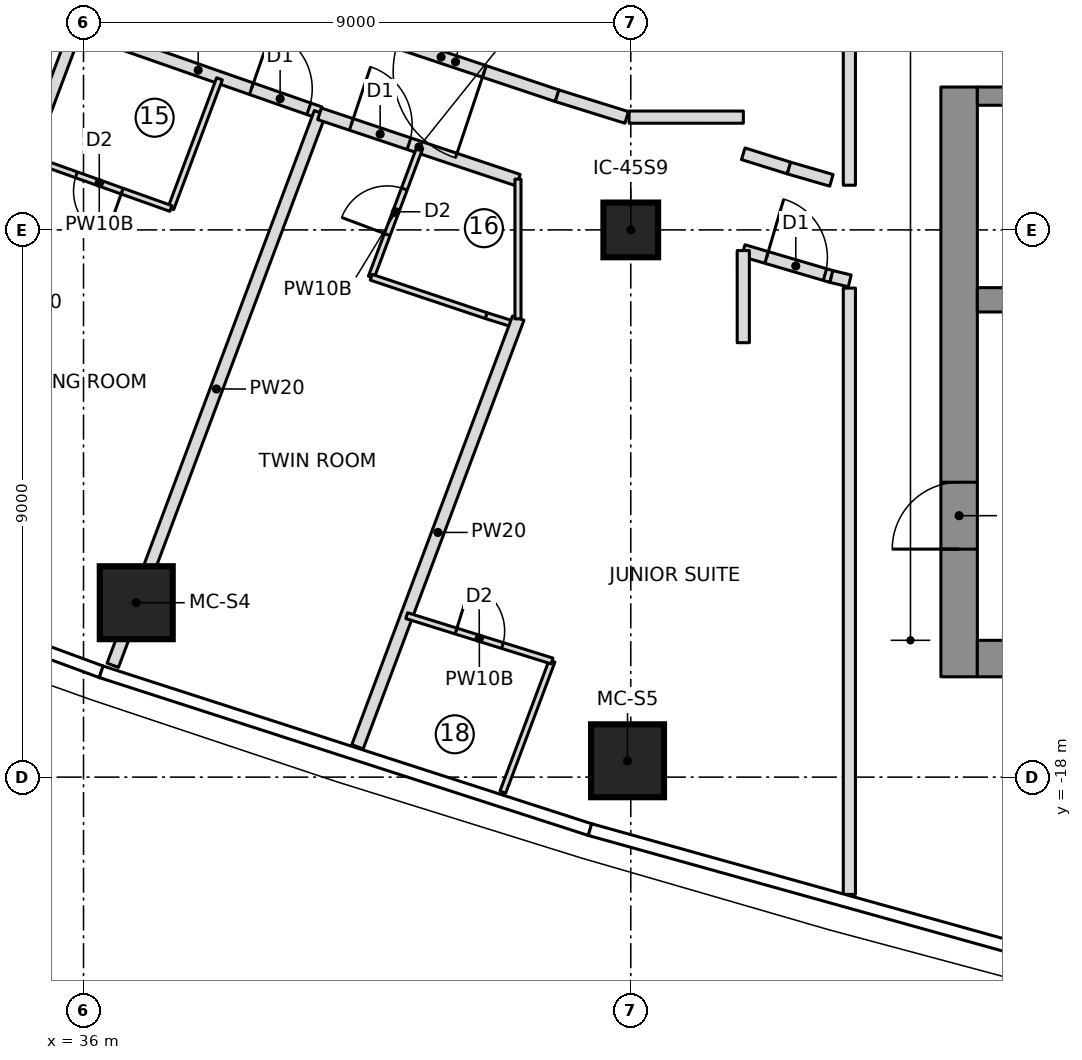
"""IFC4 building model, lengths in metres.
Left out: names, types, materials, properties, quantities, classifications, styles, units other than length and angle.
Written with IfcOpenShell. Run it as: python <this file> out.ifc"""

import sys

from ifc_helpers import new_model, si_unit, direction, frame, frame_2d, origin, origin_2d, place, context, subcontext, project, spatial, rectangle, extrude, element, fill, save


model = new_model("IFC4")
c1 = context("Model", 3, precision=1e-05, world=origin(), true_north=direction((0.0, 1.0)))
c2 = subcontext(c1, "Body", "Model", "MODEL_VIEW")
j1 = project(units=[si_unit("LENGTHUNIT", "METRE"), si_unit("PLANEANGLEUNIT", "RADIAN")], contexts=[c1])
p1 = place(None, origin())
s1 = spatial("IfcSite", under=j1, at=p1, CompositionType="ELEMENT")
p2 = place(p1, origin())
s2 = spatial("IfcBuilding", under=s1, at=p2, CompositionType="ELEMENT")
p3 = place(p2, frame((0.0, 0.0, 224.35)))
s3 = spatial("IfcBuildingStorey", under=s2, at=p3, CompositionType="ELEMENT", Elevation=224.35)
p4 = place(p3, frame((50.4, -16.35, 0.0), z_axis=(0.0, 0.0, 1.0), x_axis=(0.0, 1.0, 0.0)))
e1 = element("IfcWall", 1, at=p4, inside=s3, PredefinedType="SHEAR", context=c2, shape_type="SweptSolid", body=[
    extrude(rectangle(XDim=9.7, YDim=0.6, at=frame_2d((4.85, 0.0))), origin(), (0.0, 0.0, 1.0), 3.55),
])
p5 = place(p4, frame((2.1, 0.0, 0.0)))
e2 = element("IfcOpeningElement", 2, at=p5, cuts=e1, PredefinedType="OPENING", context=c2, shape_type="SweptSolid", body=[
    extrude(rectangle(XDim=1.1, YDim=2.1, at=frame_2d((0.55, 1.05))), frame((0.0, 0.31, 0.0), z_axis=(0.0, -1.0, 0.0), x_axis=(1.0, 0.0, 0.0)), (0.0, 0.0, 1.0), 0.62),
])
p6 = place(p3, frame((50.7, -16.05, 0.0), z_axis=(0.0, 0.0, 1.0), x_axis=(1.0, 0.0, 0.0)))
e3 = element("IfcWall", 3, at=p6, inside=s3, PredefinedType="SHEAR", context=c2, shape_type="SweptSolid", body=[
    extrude(rectangle(XDim=13.62, YDim=0.6, at=frame_2d((6.81, 0.0))), origin(), (0.0, 0.0, 1.0), 3.55),
])
p7 = place(p3, frame((50.7, -10.15, 0.0), z_axis=(0.0, 0.0, 1.0), x_axis=(1.0, 0.0, 0.0)))
e4 = element("IfcWall", 4, at=p7, inside=s3, PredefinedType="SHEAR", context=c2, shape_type="SweptSolid", body=[
    extrude(rectangle(XDim=13.02, YDim=0.4, at=frame_2d((6.51, 0.0))), origin(), (0.0, 0.0, 1.0), 3.55),
])
p8 = place(p3, frame((50.7, -6.8, 0.0), z_axis=(0.0, 0.0, 1.0), x_axis=(1.0, 0.0, 0.0)))
e5 = element("IfcWall", 5, at=p8, inside=s3, PredefinedType="SHEAR", context=c2, shape_type="SweptSolid", body=[
    extrude(rectangle(XDim=10.9, YDim=0.3, at=frame_2d((5.45, 0.0))), origin(), (0.0, 0.0, 1.0), 3.55),
])
p9 = place(p8, frame((6.3, 0.0, 0.0)))
e6 = element("IfcOpeningElement", 6, at=p9, cuts=e5, PredefinedType="OPENING", context=c2, shape_type="SweptSolid", body=[
    extrude(rectangle(XDim=1.1, YDim=2.1, at=frame_2d((0.55, 1.05))), frame((0.0, 0.16, 0.0), z_axis=(0.0, -1.0, 0.0), x_axis=(1.0, 0.0, 0.0)), (0.0, 0.0, 1.0), 0.32),
])
p10 = place(p8, frame((9.1, 0.0, 0.0)))
e7 = element("IfcOpeningElement", 7, at=p10, cuts=e5, PredefinedType="OPENING", context=c2, shape_type="SweptSolid", body=[
    extrude(rectangle(XDim=1.1, YDim=2.1, at=frame_2d((0.55, 1.05))), frame((0.0, 0.16, 0.0), z_axis=(0.0, -1.0, 0.0), x_axis=(1.0, 0.0, 0.0)), (0.0, 0.0, 1.0), 0.32),
])
p11 = place(p8, frame((0.8, 0.0, 0.0)))
e8 = element("IfcOpeningElement", 8, at=p11, cuts=e5, PredefinedType="OPENING", context=c2, shape_type="SweptSolid", body=[
    extrude(rectangle(XDim=0.9, YDim=2.1, at=frame_2d((0.45, 1.05))), frame((0.0, 0.16, 0.0), z_axis=(0.0, -1.0, 0.0), x_axis=(1.0, 0.0, 0.0)), (0.0, 0.0, 1.0), 0.32),
])
p12 = place(p8, frame((3.6, 0.0, 0.0)))
e9 = element("IfcOpeningElement", 9, at=p12, cuts=e5, PredefinedType="OPENING", context=c2, shape_type="SweptSolid", body=[
    extrude(rectangle(XDim=0.9, YDim=2.1, at=frame_2d((0.45, 1.05))), frame((0.0, 0.16, 0.0), z_axis=(0.0, -1.0, 0.0), x_axis=(1.0, 0.0, 0.0)), (0.0, 0.0, 1.0), 0.32),
])
for number, where, z_axis, x_axis in (
    (10, (36.867, -15.132, 0.0), (0.0, 0.0, 1.0), (1.0, 0.0, 0.0)),
    (11, (44.947, -17.731, 0.0), (0.0, 0.0, 1.0), (1.0, 0.0, 0.0)),
):
    element("IfcColumn", number, at=place(p3, frame(where, z_axis=z_axis, x_axis=x_axis)), inside=s3, PredefinedType="COLUMN", context=c2, shape_type="SweptSolid", body=[
        extrude(rectangle(XDim=1.2, YDim=1.2, at=origin_2d()), origin(), (0.0, 0.0, 1.0), 3.55),
    ])
p13 = place(p3, frame((45.0, -9.0, 0.0), z_axis=(0.0, 0.0, 1.0), x_axis=(1.0, 0.0, 0.0)))
e12 = element("IfcColumn", 12, at=p13, inside=s3, PredefinedType="COLUMN", context=c2, shape_type="SweptSolid", body=[
    extrude(rectangle(XDim=0.9, YDim=0.9, at=origin_2d()), origin(), (0.0, 0.0, 1.0), 3.55),
])
p14 = place(p3, frame((32.483, -14.738, 0.0), z_axis=(0.0, 0.0, 1.0), x_axis=(0.351117925717, 0.936331246002, 0.0)))
e13 = element("IfcWall", 13, at=p14, inside=s3, PredefinedType="PARTITIONING", context=c2, shape_type="SweptSolid", body=[
    extrude(rectangle(XDim=9.701, YDim=0.2, at=frame_2d((4.851, 0.0))), origin(), (0.0, 0.0, 1.0), 3.25),
])
p15 = place(p3, frame((35.882, -5.673, 0.0), z_axis=(0.0, 0.0, 1.0), x_axis=(0.944107376821, -0.329638075823, 0.0)))
e14 = element("IfcWall", 14, at=p15, inside=s3, PredefinedType="PARTITIONING", context=c2, shape_type="SweptSolid", body=[
    extrude(rectangle(XDim=4.245, YDim=0.2, at=frame_2d((2.122, 0.0))), origin(), (0.0, 0.0, 1.0), 3.25),
])
p16 = place(p15, frame((3.05, 0.0, 0.0)))
e15 = element("IfcOpeningElement", 15, at=p16, cuts=e14, PredefinedType="OPENING", context=c2, shape_type="SweptSolid", body=[
    extrude(rectangle(XDim=1.0, YDim=2.1, at=frame_2d((0.5, 1.05))), frame((0.0, 0.11, 0.0), z_axis=(0.0, -1.0, 0.0), x_axis=(1.0, 0.0, 0.0)), (0.0, 0.0, 1.0), 0.22),
])
p17 = place(p3, frame((38.236, -6.516, 0.0), z_axis=(0.0, 0.0, 1.0), x_axis=(-0.351229183496, -0.936289517543, 0.0)))
e16 = element("IfcWall", 16, at=p17, inside=s3, PredefinedType="PARTITIONING", context=c2, shape_type="SweptSolid", body=[
    extrude(rectangle(XDim=2.277, YDim=0.1, at=frame_2d((1.139, 0.0))), origin(), (0.0, 0.0, 1.0), 3.25),
])
p18 = place(p3, frame((37.436, -8.648, 0.0), z_axis=(0.0, 0.0, 1.0), x_axis=(-0.941896455552, 0.335903359641, 0.0)))
e17 = element("IfcWall", 17, at=p18, inside=s3, PredefinedType="PARTITIONING", context=c2, shape_type="SweptSolid", body=[
    extrude(rectangle(XDim=2.5, YDim=0.1, at=frame_2d((1.25, 0.0))), origin(), (0.0, 0.0, 1.0), 3.25),
])
p19 = place(p18, frame((0.85, 0.0, 0.0)))
e18 = element("IfcOpeningElement", 18, at=p19, cuts=e17, PredefinedType="OPENING", context=c2, shape_type="SweptSolid", body=[
    extrude(rectangle(XDim=0.8, YDim=2.1, at=frame_2d((0.4, 1.05))), frame((0.0, 0.06, 0.0), z_axis=(0.0, -1.0, 0.0), x_axis=(1.0, 0.0, 0.0)), (0.0, 0.0, 1.0), 0.12),
])
p20 = place(p3, frame((36.481, -16.161, 0.0), z_axis=(0.0, 0.0, 1.0), x_axis=(0.35112895446, 0.936327110224, 0.0)))
e19 = element("IfcWall", 19, at=p20, inside=s3, PredefinedType="PARTITIONING", context=c2, shape_type="SweptSolid", body=[
    extrude(rectangle(XDim=9.706, YDim=0.2, at=frame_2d((4.853, 0.0))), origin(), (0.0, 0.0, 1.0), 3.25),
])
p21 = place(p3, frame((39.882, -7.091, 0.0), z_axis=(0.0, 0.0, 1.0), x_axis=(0.948477584784, -0.316844238013, 0.0)))
e20 = element("IfcWall", 20, at=p21, inside=s3, PredefinedType="PARTITIONING", context=c2, shape_type="SweptSolid", body=[
    extrude(rectangle(XDim=3.445, YDim=0.2, at=frame_2d((1.723, 0.0))), origin(), (0.0, 0.0, 1.0), 3.25),
])
p22 = place(p21, frame((0.55, 0.0, 0.0)))
e21 = element("IfcOpeningElement", 21, at=p22, cuts=e20, PredefinedType="OPENING", context=c2, shape_type="SweptSolid", body=[
    extrude(rectangle(XDim=1.0, YDim=2.1, at=frame_2d((0.5, 1.05))), frame((0.0, 0.11, 0.0), z_axis=(0.0, -1.0, 0.0), x_axis=(1.0, 0.0, 0.0)), (0.0, 0.0, 1.0), 0.22),
])
p23 = place(p3, frame((40.732, -9.779, 0.0), z_axis=(0.0, 0.0, 1.0), x_axis=(0.351146927505, 0.936320370014, 0.0)))
e22 = element("IfcWall", 22, at=p23, inside=s3, PredefinedType="PARTITIONING", context=c2, shape_type="SweptSolid", body=[
    extrude(rectangle(XDim=2.278, YDim=0.1, at=frame_2d((1.139, 0.0))), origin(), (0.0, 0.0, 1.0), 3.25),
])
p24 = place(p23, frame((0.75, 0.0, 0.0)))
e23 = element("IfcOpeningElement", 23, at=p24, cuts=e22, PredefinedType="OPENING", context=c2, shape_type="SweptSolid", body=[
    extrude(rectangle(XDim=0.8, YDim=2.1, at=frame_2d((0.4, 1.05))), frame((0.0, 0.06, 0.0), z_axis=(0.0, -1.0, 0.0), x_axis=(1.0, 0.0, 0.0)), (0.0, 0.0, 1.0), 0.12),
])
p25 = place(p3, frame((43.108, -10.562, 0.0), z_axis=(0.0, 0.0, 1.0), x_axis=(-0.954624465478, 0.297812239356, 0.0)))
e24 = element("IfcWall", 24, at=p25, inside=s3, PredefinedType="PARTITIONING", context=c2, shape_type="SweptSolid", body=[
    extrude(rectangle(XDim=0.511, YDim=0.1, at=frame_2d((0.255, 0.0))), origin(), (0.0, 0.0, 1.0), 3.25),
])
p26 = place(p3, frame((42.621, -10.409, 0.0), z_axis=(0.0, 0.0, 1.0), x_axis=(-0.948499248693, 0.316779379426, 0.0)))
e25 = element("IfcWall", 25, at=p26, inside=s3, PredefinedType="PARTITIONING", context=c2, shape_type="SweptSolid", body=[
    extrude(rectangle(XDim=1.991, YDim=0.1, at=frame_2d((0.996, 0.0))), origin(), (0.0, 0.0, 1.0), 3.25),
])
p27 = place(p3, frame((40.506, -17.501, 0.0), z_axis=(0.0, 0.0, 1.0), x_axis=(0.351119888923, 0.936330509811, 0.0)))
e26 = element("IfcWall", 26, at=p27, inside=s3, PredefinedType="PARTITIONING", context=c2, shape_type="SweptSolid", body=[
    extrude(rectangle(XDim=7.531, YDim=0.2, at=frame_2d((3.766, 0.0))), origin(), (0.0, 0.0, 1.0), 3.25),
])
p28 = place(p3, frame((43.705, -16.09, 0.0), z_axis=(0.0, 0.0, 1.0), x_axis=(-0.351111827312, -0.936333532841, 0.0)))
e27 = element("IfcWall", 27, at=p28, inside=s3, PredefinedType="PARTITIONING", context=c2, shape_type="SweptSolid", body=[
    extrude(rectangle(XDim=2.304, YDim=0.1, at=frame_2d((1.152, 0.0))), origin(), (0.0, 0.0, 1.0), 3.25),
])
p29 = place(p3, frame((41.315, -15.344, 0.0), z_axis=(0.0, 0.0, 1.0), x_axis=(0.954665433195, -0.297680887299, 0.0)))
e28 = element("IfcWall", 28, at=p29, inside=s3, PredefinedType="PARTITIONING", context=c2, shape_type="SweptSolid", body=[
    extrude(rectangle(XDim=2.504, YDim=0.1, at=frame_2d((1.252, 0.0))), origin(), (0.0, 0.0, 1.0), 3.25),
])
p30 = place(p29, frame((0.85, 0.0, 0.0)))
e29 = element("IfcOpeningElement", 29, at=p30, cuts=e28, PredefinedType="OPENING", context=c2, shape_type="SweptSolid", body=[
    extrude(rectangle(XDim=0.8, YDim=2.1, at=frame_2d((0.4, 1.05))), frame((0.0, 0.06, 0.0), z_axis=(0.0, -1.0, 0.0), x_axis=(1.0, 0.0, 0.0)), (0.0, 0.0, 1.0), 0.12),
])
p31 = place(p3, frame((43.788, -6.793, 0.0), z_axis=(0.0, 0.0, 1.0), x_axis=(-0.948475139593, 0.316851557632, 0.0)))
e30 = element("IfcWall", 30, at=p31, inside=s3, PredefinedType="PARTITIONING", context=c2, shape_type="SweptSolid", body=[
    extrude(rectangle(XDim=3.522, YDim=0.2, at=frame_2d((1.761, 0.0))), origin(), (0.0, 0.0, 1.0), 3.25),
])
p32 = place(p31, frame((1.261, 0.0, 0.0)))
e31 = element("IfcOpeningElement", 31, at=p32, cuts=e30, PredefinedType="OPENING", context=c2, shape_type="SweptSolid", body=[
    extrude(rectangle(XDim=1.5, YDim=2.1, at=frame_2d((0.75, 1.05))), frame((0.0, 0.11, 0.0), z_axis=(0.0, -1.0, 0.0), x_axis=(1.0, 0.0, 0.0)), (0.0, 0.0, 1.0), 0.22),
])
p33 = place(p3, frame((47.602, -7.982, 0.0), z_axis=(0.0, 0.0, 1.0), x_axis=(-0.95461224237, 0.297851417181, 0.0)))
e32 = element("IfcWall", 32, at=p33, inside=s3, PredefinedType="PARTITIONING", context=c2, shape_type="SweptSolid", body=[
    extrude(rectangle(XDim=0.788, YDim=0.2, at=frame_2d((0.394, 0.0))), origin(), (0.0, 0.0, 1.0), 3.25),
])
p34 = place(p3, frame((44.933, -7.15, 0.0), z_axis=(0.0, 0.0, 1.0), x_axis=(-0.954693570678, 0.29759063511, 0.0)))
e33 = element("IfcWall", 33, at=p34, inside=s3, PredefinedType="PARTITIONING", context=c2, shape_type="SweptSolid", body=[
    extrude(rectangle(XDim=1.198, YDim=0.2, at=frame_2d((0.599, 0.0))), origin(), (0.0, 0.0, 1.0), 3.25),
])
p35 = place(p3, frame((43.145, -8.165, 0.0), z_axis=(0.0, 0.0, 1.0), x_axis=(0.0, -1.0, 0.0)))
e34 = element("IfcWall", 34, at=p35, inside=s3, PredefinedType="PARTITIONING", context=c2, shape_type="SweptSolid", body=[
    extrude(rectangle(XDim=2.298, YDim=0.1, at=frame_2d((1.149, 0.0))), origin(), (0.0, 0.0, 1.0), 3.25),
])
p36 = place(p3, frame((46.85, -9.34, 0.0), z_axis=(0.0, 0.0, 1.0), x_axis=(0.95944263903, -0.281903924079, 0.0)))
e35 = element("IfcWall", 35, at=p36, inside=s3, PredefinedType="PARTITIONING", context=c2, shape_type="SweptSolid", body=[
    extrude(rectangle(XDim=1.511, YDim=0.2, at=frame_2d((0.756, 0.0))), origin(), (0.0, 0.0, 1.0), 3.25),
])
p37 = place(p36, frame((0.4, 0.0, 0.0)))
e36 = element("IfcOpeningElement", 36, at=p37, cuts=e35, PredefinedType="OPENING", context=c2, shape_type="SweptSolid", body=[
    extrude(rectangle(XDim=1.0, YDim=2.1, at=frame_2d((0.5, 1.05))), frame((0.0, 0.11, 0.0), z_axis=(0.0, -1.0, 0.0), x_axis=(1.0, 0.0, 0.0)), (0.0, 0.0, 1.0), 0.22),
])
p38 = place(p3, frame((48.3, -8.185, 0.0), z_axis=(0.0, 0.0, 1.0), x_axis=(-0.960439023181, 0.278490363839, 0.0)))
e37 = element("IfcWall", 37, at=p38, inside=s3, PredefinedType="PARTITIONING", context=c2, shape_type="SweptSolid", body=[
    extrude(rectangle(XDim=0.727, YDim=0.2, at=frame_2d((0.363, 0.0))), origin(), (0.0, 0.0, 1.0), 3.25),
])
p39 = place(p3, frame((48.595, 8.265, 0.0), z_axis=(0.0, 0.0, 1.0), x_axis=(0.0, -1.0, 0.0)))
e38 = element("IfcWall", 38, at=p39, inside=s3, PredefinedType="PARTITIONING", context=c2, shape_type="SweptSolid", body=[
    extrude(rectangle(XDim=16.53, YDim=0.2, at=frame_2d((8.265, 0.0))), origin(), (0.0, 0.0, 1.0), 3.25),
])
p40 = place(p3, frame((46.852, -7.145, 0.0), z_axis=(0.0, 0.0, 1.0), x_axis=(-0.99999999156, 0.000129920747, 0.0)))
e39 = element("IfcWall", 39, at=p40, inside=s3, PredefinedType="PARTITIONING", context=c2, shape_type="SweptSolid", body=[
    extrude(rectangle(XDim=1.879, YDim=0.2, at=frame_2d((0.939, 0.0))), origin(), (0.0, 0.0, 1.0), 3.25),
])
p41 = place(p3, frame((46.851, -10.855, 0.0), z_axis=(0.0, 0.0, 1.0), x_axis=(-0.000322320692, 0.999999948055, 0.0)))
e40 = element("IfcWall", 40, at=p41, inside=s3, PredefinedType="PARTITIONING", context=c2, shape_type="SweptSolid", body=[
    extrude(rectangle(XDim=1.515, YDim=0.2, at=frame_2d((0.757, 0.0))), origin(), (0.0, 0.0, 1.0), 3.25),
])
p42 = place(p3, frame((48.3, -9.766, 0.0), z_axis=(0.0, 0.0, 1.0), x_axis=(0.972415906571, -0.233253734477, 0.0)))
e41 = element("IfcWall", 41, at=p42, inside=s3, PredefinedType="PARTITIONING", context=c2, shape_type="SweptSolid", body=[
    extrude(rectangle(XDim=0.31, YDim=0.2, at=frame_2d((0.155, 0.0))), origin(), (0.0, 0.0, 1.0), 3.25),
])
p43 = place(p3, frame((48.595, -9.957, 0.0), z_axis=(0.0, 0.0, 1.0), x_axis=(0.0, -1.0, 0.0)))
e42 = element("IfcWall", 42, at=p43, inside=s3, PredefinedType="PARTITIONING", context=c2, shape_type="SweptSolid", body=[
    extrude(rectangle(XDim=9.972, YDim=0.2, at=frame_2d((4.986, 0.0))), origin(), (0.0, 0.0, 1.0), 3.25),
])
p44 = place(p19, origin())
e43 = element("IfcDoor", 43, at=p44, inside=s3, OperationType="SINGLE_SWING_LEFT", PredefinedType="DOOR", context=c2, shape_type="SweptSolid", body=[
    extrude(rectangle(XDim=0.8, YDim=2.1, at=frame_2d((0.4, 1.05))), frame((0.0, 0.025, 0.0), z_axis=(0.0, -1.0, 0.0), x_axis=(1.0, 0.0, 0.0)), (0.0, 0.0, 1.0), 0.05),
])
fill(e18, e43)
p45 = place(p16, origin())
e44 = element("IfcDoor", 44, at=p45, inside=s3, OperationType="SINGLE_SWING_LEFT", PredefinedType="DOOR", context=c2, shape_type="SweptSolid", body=[
    extrude(rectangle(XDim=1.0, YDim=2.1, at=frame_2d((0.5, 1.05))), frame((0.0, 0.025, 0.0), z_axis=(0.0, -1.0, 0.0), x_axis=(1.0, 0.0, 0.0)), (0.0, 0.0, 1.0), 0.05),
])
fill(e15, e44)
p46 = place(p24, origin())
e45 = element("IfcDoor", 45, at=p46, inside=s3, OperationType="SINGLE_SWING_LEFT", PredefinedType="DOOR", context=c2, shape_type="SweptSolid", body=[
    extrude(rectangle(XDim=0.8, YDim=2.1, at=frame_2d((0.4, 1.05))), frame((0.0, 0.025, 0.0), z_axis=(0.0, -1.0, 0.0), x_axis=(1.0, 0.0, 0.0)), (0.0, 0.0, 1.0), 0.05),
])
fill(e23, e45)
p47 = place(p22, origin())
e46 = element("IfcDoor", 46, at=p47, inside=s3, OperationType="SINGLE_SWING_LEFT", PredefinedType="DOOR", context=c2, shape_type="SweptSolid", body=[
    extrude(rectangle(XDim=1.0, YDim=2.1, at=frame_2d((0.5, 1.05))), frame((0.0, 0.025, 0.0), z_axis=(0.0, -1.0, 0.0), x_axis=(1.0, 0.0, 0.0)), (0.0, 0.0, 1.0), 0.05),
])
fill(e21, e46)
p48 = place(p30, origin())
e47 = element("IfcDoor", 47, at=p48, inside=s3, OperationType="SINGLE_SWING_LEFT", PredefinedType="DOOR", context=c2, shape_type="SweptSolid", body=[
    extrude(rectangle(XDim=0.8, YDim=2.1, at=frame_2d((0.4, 1.05))), frame((0.0, 0.025, 0.0), z_axis=(0.0, -1.0, 0.0), x_axis=(1.0, 0.0, 0.0)), (0.0, 0.0, 1.0), 0.05),
])
fill(e29, e47)
p49 = place(p37, origin())
e48 = element("IfcDoor", 48, at=p49, inside=s3, OperationType="SINGLE_SWING_LEFT", PredefinedType="DOOR", context=c2, shape_type="SweptSolid", body=[
    extrude(rectangle(XDim=1.0, YDim=2.1, at=frame_2d((0.5, 1.05))), frame((0.0, 0.025, 0.0), z_axis=(0.0, -1.0, 0.0), x_axis=(1.0, 0.0, 0.0)), (0.0, 0.0, 1.0), 0.05),
])
fill(e36, e48)
p50 = place(p32, origin())
e49 = element("IfcDoor", 49, at=p50, inside=s3, OperationType="DOUBLE_DOOR_SINGLE_SWING", PredefinedType="DOOR", context=c2, shape_type="SweptSolid", body=[
    extrude(rectangle(XDim=1.5, YDim=2.1, at=frame_2d((0.75, 1.05))), frame((0.0, 0.025, 0.0), z_axis=(0.0, -1.0, 0.0), x_axis=(1.0, 0.0, 0.0)), (0.0, 0.0, 1.0), 0.05),
])
fill(e31, e49)
p51 = place(p5, origin())
e50 = element("IfcDoor", 50, at=p51, inside=s3, OperationType="SINGLE_SWING_RIGHT", PredefinedType="DOOR", context=c2, shape_type="SweptSolid", body=[
    extrude(rectangle(XDim=1.1, YDim=2.1, at=frame_2d((0.55, 1.05))), frame((0.0, 0.025, 0.0), z_axis=(0.0, -1.0, 0.0), x_axis=(1.0, 0.0, 0.0)), (0.0, 0.0, 1.0), 0.05),
])
fill(e2, e50)
save(model, sys.argv[1])
